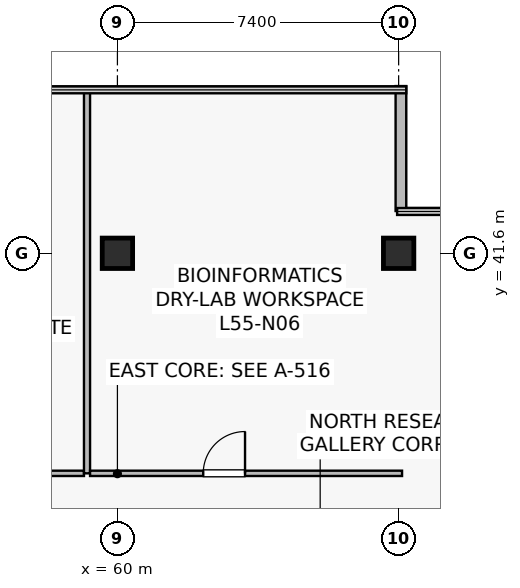
"""IFC4 building model, lengths in metres.
Left out: names, types, materials, properties, quantities, classifications, styles, units other than length and angle.
Written with IfcOpenShell. Run it as: python <this file> out.ifc"""

import sys

from ifc_helpers import new_model, si_unit, direction, frame, frame_2d, origin, origin_2d, place, context, subcontext, project, spatial, rectangle, extrude, source, transform, mapped, element, fill, save


model = new_model("IFC4")
c1 = context("Model", 3, precision=1e-05, world=origin(), true_north=direction((0.0, 1.0)))
c2 = subcontext(c1, "Body", "Model", "MODEL_VIEW")
j1 = project(units=[si_unit("LENGTHUNIT", "METRE"), si_unit("PLANEANGLEUNIT", "RADIAN")], contexts=[c1])
p1 = place(None, origin())
s1 = spatial("IfcSite", under=j1, at=p1, CompositionType="ELEMENT")
p2 = place(p1, origin())
s2 = spatial("IfcBuilding", under=s1, at=p2, CompositionType="ELEMENT")
p3 = place(p2, frame((0.0, 0.0, 230.1)))
s3 = spatial("IfcBuildingStorey", under=s2, at=p3, CompositionType="ELEMENT", Elevation=230.1)
m1 = source(origin(), c2, "Body", "SweptSolid", [
    extrude(rectangle(XDim=0.8, YDim=0.8, at=origin_2d()), origin(), (0.0, 0.0, 1.0), 4.1),
])
for number, where, z_axis, x_axis in (
    (1, (60.0, 41.6, 0.0), (0.0, 0.0, 1.0), (1.0, 0.0, 0.0)),
    (2, (67.4, 41.6, 0.0), (0.0, 0.0, 1.0), (1.0, 0.0, 0.0)),
):
    element("IfcColumn", number, at=place(p3, frame(where, z_axis=z_axis, x_axis=x_axis)), inside=s3, PredefinedType="COLUMN", context=c2, shape_type="MappedRepresentation", body=[
        mapped(m1, transform((0.0, 0.0, 0.0), scale=1.0)),
    ])
p4 = place(p3, frame((67.46, 42.712, 0.0), z_axis=(0.0, 0.0, 1.0), x_axis=(0.0, 1.0, 0.0)))
e3 = element("IfcWall", 3, at=p4, inside=s3, PredefinedType="STANDARD", context=c2, shape_type="SweptSolid", body=[
    extrude(rectangle(XDim=3.288, YDim=0.28, at=frame_2d((1.644, 0.0))), origin(), (0.0, 0.0, 1.0), 3.8),
])
p5 = place(p3, frame((47.68, 35.81, 0.0), z_axis=(0.0, 0.0, 1.0), x_axis=(1.0, 0.0, 0.0)))
e4 = element("IfcWall", 4, at=p5, inside=s3, PredefinedType="PARTITIONING", context=c2, shape_type="SweptSolid", body=[
    extrude(rectangle(XDim=11.44, YDim=0.14, at=frame_2d((5.72, 0.0))), origin(), (0.0, 0.0, 1.0), 3.197),
])
p6 = place(p5, frame((5.459, 0.0, 0.0)))
e5 = element("IfcOpeningElement", 5, at=p6, cuts=e4, PredefinedType="OPENING", context=c2, shape_type="SweptSolid", body=[
    extrude(rectangle(XDim=1.1, YDim=2.18, at=frame_2d((0.55, 1.09))), frame((0.0, 0.08, 0.0), z_axis=(0.0, -1.0, 0.0), x_axis=(1.0, 0.0, 0.0)), (0.0, 0.0, 1.0), 0.16),
])
p7 = place(p3, frame((59.2, 35.81, 0.0), z_axis=(0.0, 0.0, 1.0), x_axis=(0.0, 1.0, 0.0)))
e6 = element("IfcWall", 6, at=p7, inside=s3, PredefinedType="PARTITIONING", context=c2, shape_type="SweptSolid", body=[
    extrude(rectangle(XDim=10.08, YDim=0.16, at=frame_2d((5.04, 0.0))), origin(), (0.0, 0.0, 1.0), 3.135),
])
p8 = place(p3, frame((59.28, 35.81, 0.0), z_axis=(0.0, 0.0, 1.0), x_axis=(1.0, 0.0, 0.0)))
e7 = element("IfcWall", 7, at=p8, inside=s3, PredefinedType="PARTITIONING", context=c2, shape_type="SweptSolid", body=[
    extrude(rectangle(XDim=8.21, YDim=0.14, at=frame_2d((4.105, 0.0))), origin(), (0.0, 0.0, 1.0), 3.197),
])
p9 = place(p8, frame((2.978, 0.0, 0.0)))
e8 = element("IfcOpeningElement", 8, at=p9, cuts=e7, PredefinedType="OPENING", context=c2, shape_type="SweptSolid", body=[
    extrude(rectangle(XDim=1.1, YDim=2.18, at=frame_2d((0.55, 1.09))), frame((0.0, 0.08, 0.0), z_axis=(0.0, -1.0, 0.0), x_axis=(1.0, 0.0, 0.0)), (0.0, 0.0, 1.0), 0.16),
])
m2 = source(origin(), c2, "Body", "SweptSolid", [
    extrude(rectangle(XDim=1.1, YDim=2.18, at=frame_2d((0.55, 1.09))), frame((0.0, 0.025, 0.0), z_axis=(0.0, -1.0, 0.0), x_axis=(1.0, 0.0, 0.0)), (0.0, 0.0, 1.0), 0.05),
])
p10 = place(p9, origin())
e9 = element("IfcDoor", 9, at=p10, inside=s3, OperationType="SINGLE_SWING_RIGHT", PredefinedType="DOOR", context=c2, shape_type="MappedRepresentation", body=[
    mapped(m2, transform((0.0, 0.0, 0.0), scale=1.0)),
])
fill(e8, e9)
save(model, sys.argv[1])
